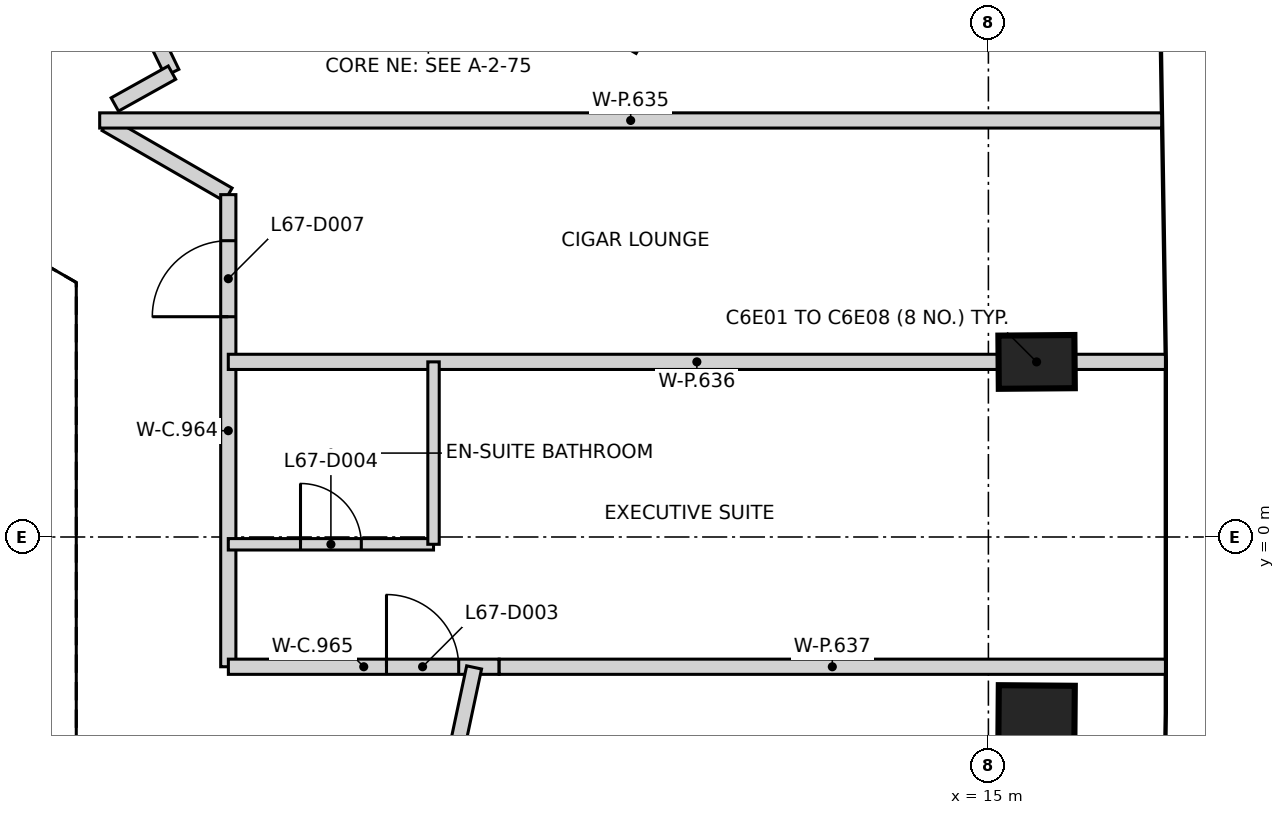
"""IFC4 building model, lengths in metres.
Left out: names, types, materials, properties, quantities, classifications, styles, units other than length and angle.
Written with IfcOpenShell. Run it as: python <this file> out.ifc"""

import sys

from ifc_helpers import new_model, si_unit, direction, frame, frame_2d, origin, origin_2d, place, context, subcontext, project, spatial, rectangle, extrude, element, fill, save


model = new_model("IFC4")
c1 = context("Model", 3, precision=1e-05, world=origin(), true_north=direction((0.0, 1.0)))
c2 = subcontext(c1, "Body", "Model", "MODEL_VIEW")
j1 = project(units=[si_unit("LENGTHUNIT", "METRE"), si_unit("PLANEANGLEUNIT", "RADIAN")], contexts=[c1])
p1 = place(None, origin())
s1 = spatial("IfcSite", under=j1, at=p1, CompositionType="ELEMENT")
p2 = place(p1, origin())
s2 = spatial("IfcBuilding", under=s1, at=p2, CompositionType="ELEMENT")
p3 = place(p2, frame((0.0, 0.0, 265.8)))
s3 = spatial("IfcBuildingStorey", under=s2, at=p3, CompositionType="ELEMENT", Elevation=265.8)
for number, where, z_axis, x_axis in (
    (1, (15.634, -2.303, -0.35), (0.0, 0.0, 1.0), (-1.0, 0.008, 0.0)),
    (2, (15.634, 2.303, -0.35), (0.0, 0.0, 1.0), (1.0, 0.008, 0.0)),
):
    element("IfcColumn", number, at=place(p3, frame(where, z_axis=z_axis, x_axis=x_axis)), inside=s3, PredefinedType="COLUMN", context=c2, shape_type="SweptSolid", body=[
        extrude(rectangle(XDim=1.0, YDim=0.7, at=origin_2d()), origin(), (0.0, 0.0, 1.0), 3.6),
    ])
p4 = place(p3, frame((4.26, 6.109, 0.0), z_axis=(0.0, 0.0, 1.0), x_axis=(-0.434189007872, 0.900821794498, 0.0)))
e3 = element("IfcWall", 3, at=p4, inside=s3, PredefinedType="PARTITIONING", context=c2, shape_type="SweptSolid", body=[
    extrude(rectangle(XDim=3.853, YDim=0.2, at=frame_2d((1.926, 0.0))), origin(), (0.0, 0.0, 1.0), 3.25),
])
p5 = place(p4, frame((2.853, 0.0, 0.0)))
e4 = element("IfcOpeningElement", 4, at=p5, cuts=e3, PredefinedType="OPENING", context=c2, shape_type="SweptSolid", body=[
    extrude(rectangle(XDim=0.9, YDim=2.1, at=frame_2d((0.45, 1.05))), frame((0.0, 0.11, 0.0), z_axis=(0.0, -1.0, 0.0), x_axis=(1.0, 0.0, 0.0)), (0.0, 0.0, 1.0), 0.22),
])
p6 = place(p4, frame((0.804, 0.0, 0.0)))
e5 = element("IfcOpeningElement", 5, at=p6, cuts=e3, PredefinedType="OPENING", context=c2, shape_type="SweptSolid", body=[
    extrude(rectangle(XDim=1.0, YDim=2.1, at=frame_2d((0.5, 1.05))), frame((0.0, 0.11, 0.0), z_axis=(0.0, -1.0, 0.0), x_axis=(1.0, 0.0, 0.0)), (0.0, 0.0, 1.0), 0.22),
])
p7 = place(p3, frame((3.39, 5.433, 0.0), z_axis=(0.0, 0.0, 1.0), x_axis=(0.866117799835, -0.499839931186, 0.0)))
e6 = element("IfcWall", 6, at=p7, inside=s3, PredefinedType="PARTITIONING", context=c2, shape_type="SweptSolid", body=[
    extrude(rectangle(XDim=1.859, YDim=0.2, at=frame_2d((0.929, 0.0))), origin(), (0.0, 0.0, 1.0), 3.25),
])
p8 = place(p3, frame((3.507, 5.69, 0.0), z_axis=(0.0, 0.0, 1.0), x_axis=(0.873567976284, 0.486702158215, 0.0)))
e7 = element("IfcWall", 7, at=p8, inside=s3, PredefinedType="PARTITIONING", context=c2, shape_type="SweptSolid", body=[
    extrude(rectangle(XDim=0.861, YDim=0.2, at=frame_2d((0.43, 0.0))), origin(), (0.0, 0.0, 1.0), 3.25),
])
p9 = place(p3, frame((5.0, -1.707, 0.0), z_axis=(0.0, 0.0, 1.0), x_axis=(0.0, 1.0, 0.0)))
e8 = element("IfcWall", 8, at=p9, inside=s3, PredefinedType="PARTITIONING", context=c2, shape_type="SweptSolid", body=[
    extrude(rectangle(XDim=6.211, YDim=0.2, at=frame_2d((3.105, 0.0))), origin(), (0.0, 0.0, 1.0), 3.25),
])
p10 = place(p9, frame((4.605, 0.0, 0.0)))
e9 = element("IfcOpeningElement", 9, at=p10, cuts=e8, PredefinedType="OPENING", context=c2, shape_type="SweptSolid", body=[
    extrude(rectangle(XDim=1.0, YDim=2.1, at=frame_2d((0.5, 1.05))), frame((0.0, 0.11, 0.0), z_axis=(0.0, -1.0, 0.0), x_axis=(1.0, 0.0, 0.0)), (0.0, 0.0, 1.0), 0.22),
])
p11 = place(p3, frame((5.001, -1.707, 0.0), z_axis=(0.0, 0.0, 1.0), x_axis=(1.0, 0.0, 0.0)))
e10 = element("IfcWall", 10, at=p11, inside=s3, PredefinedType="PARTITIONING", context=c2, shape_type="SweptSolid", body=[
    extrude(rectangle(XDim=3.562, YDim=0.2, at=frame_2d((1.781, 0.0))), origin(), (0.0, 0.0, 1.0), 3.25),
])
p12 = place(p11, frame((2.08, 0.0, 0.0)))
e11 = element("IfcOpeningElement", 11, at=p12, cuts=e10, PredefinedType="OPENING", context=c2, shape_type="SweptSolid", body=[
    extrude(rectangle(XDim=0.95, YDim=2.1, at=frame_2d((0.475, 1.05))), frame((0.0, 0.11, 0.0), z_axis=(0.0, -1.0, 0.0), x_axis=(1.0, 0.0, 0.0)), (0.0, 0.0, 1.0), 0.22),
])
p13 = place(p3, frame((7.673, -4.354, 0.0), z_axis=(0.0, 0.0, 1.0), x_axis=(0.207939957157, 0.978141592111, 0.0)))
e12 = element("IfcWall", 12, at=p13, inside=s3, PredefinedType="PARTITIONING", context=c2, shape_type="SweptSolid", body=[
    extrude(rectangle(XDim=2.697, YDim=0.2, at=frame_2d((1.348, 0.0))), origin(), (0.0, 0.0, 1.0), 3.25),
])
p14 = place(p3, frame((3.308, 5.48, 0.0), z_axis=(0.0, 0.0, 1.0), x_axis=(1.0, 0.0, 0.0)))
e13 = element("IfcWall", 13, at=p14, inside=s3, PredefinedType="PARTITIONING", context=c2, shape_type="SweptSolid", body=[
    extrude(rectangle(XDim=13.971, YDim=0.2, at=frame_2d((6.986, 0.0))), origin(), (0.0, 0.0, 1.0), 2.35),
])
p15 = place(p3, frame((5.0, 2.304, 0.0), z_axis=(0.0, 0.0, 1.0), x_axis=(1.0, 0.0, 0.0)))
e14 = element("IfcWall", 14, at=p15, inside=s3, PredefinedType="PARTITIONING", context=c2, shape_type="SweptSolid", body=[
    extrude(rectangle(XDim=12.329, YDim=0.2, at=frame_2d((6.165, 0.0))), origin(), (0.0, 0.0, 1.0), 3.25),
])
p16 = place(p3, frame((8.564, -1.707, 0.0), z_axis=(0.0, 0.0, 1.0), x_axis=(1.0, 0.0, 0.0)))
e15 = element("IfcWall", 15, at=p16, inside=s3, PredefinedType="PARTITIONING", context=c2, shape_type="SweptSolid", body=[
    extrude(rectangle(XDim=8.765, YDim=0.2, at=frame_2d((4.383, 0.0))), origin(), (0.0, 0.0, 1.0), 2.35),
])
p17 = place(p3, frame((5.0, -0.096, 0.0), z_axis=(0.0, 0.0, 1.0), x_axis=(1.0, 0.0, 0.0)))
e16 = element("IfcWall", 16, at=p17, inside=s3, PredefinedType="PARTITIONING", context=c2, shape_type="SweptSolid", body=[
    extrude(rectangle(XDim=2.7, YDim=0.15, at=frame_2d((1.35, 0.0))), origin(), (0.0, 0.0, 1.0), 3.25),
])
p18 = place(p17, frame((0.95, 0.0, 0.0)))
e17 = element("IfcOpeningElement", 17, at=p18, cuts=e16, PredefinedType="OPENING", context=c2, shape_type="SweptSolid", body=[
    extrude(rectangle(XDim=0.8, YDim=2.1, at=frame_2d((0.4, 1.05))), frame((0.0, 0.085, 0.0), z_axis=(0.0, -1.0, 0.0), x_axis=(1.0, 0.0, 0.0)), (0.0, 0.0, 1.0), 0.17),
])
p19 = place(p3, frame((7.7, -0.096, 0.0), z_axis=(0.0, 0.0, 1.0), x_axis=(0.0, 1.0, 0.0)))
e18 = element("IfcWall", 18, at=p19, inside=s3, PredefinedType="PARTITIONING", context=c2, shape_type="SweptSolid", body=[
    extrude(rectangle(XDim=2.4, YDim=0.15, at=frame_2d((1.2, 0.0))), origin(), (0.0, 0.0, 1.0), 3.25),
])
p20 = place(p12, origin())
e19 = element("IfcDoor", 19, at=p20, inside=s3, OperationType="SINGLE_SWING_LEFT", PredefinedType="DOOR", context=c2, shape_type="SweptSolid", body=[
    extrude(rectangle(XDim=0.95, YDim=2.1, at=frame_2d((0.475, 1.05))), frame((0.0, 0.025, 0.0), z_axis=(0.0, -1.0, 0.0), x_axis=(1.0, 0.0, 0.0)), (0.0, 0.0, 1.0), 0.05),
])
fill(e11, e19)
p21 = place(p18, origin())
e20 = element("IfcDoor", 20, at=p21, inside=s3, OperationType="SINGLE_SWING_LEFT", PredefinedType="DOOR", context=c2, shape_type="SweptSolid", body=[
    extrude(rectangle(XDim=0.8, YDim=2.1, at=frame_2d((0.4, 1.05))), frame((0.0, 0.025, 0.0), z_axis=(0.0, -1.0, 0.0), x_axis=(1.0, 0.0, 0.0)), (0.0, 0.0, 1.0), 0.05),
])
fill(e17, e20)
p22 = place(p10, frame((1.0, 0.0, 0.0), z_axis=(0.0, 0.0, 1.0), x_axis=(-1.0, 0.0, 0.0)))
e21 = element("IfcDoor", 21, at=p22, inside=s3, OperationType="SINGLE_SWING_LEFT", PredefinedType="DOOR", context=c2, shape_type="SweptSolid", body=[
    extrude(rectangle(XDim=1.0, YDim=2.1, at=frame_2d((0.5, 1.05))), frame((0.0, 0.025, 0.0), z_axis=(0.0, -1.0, 0.0), x_axis=(1.0, 0.0, 0.0)), (0.0, 0.0, 1.0), 0.05),
])
fill(e9, e21)
save(model, sys.argv[1])
